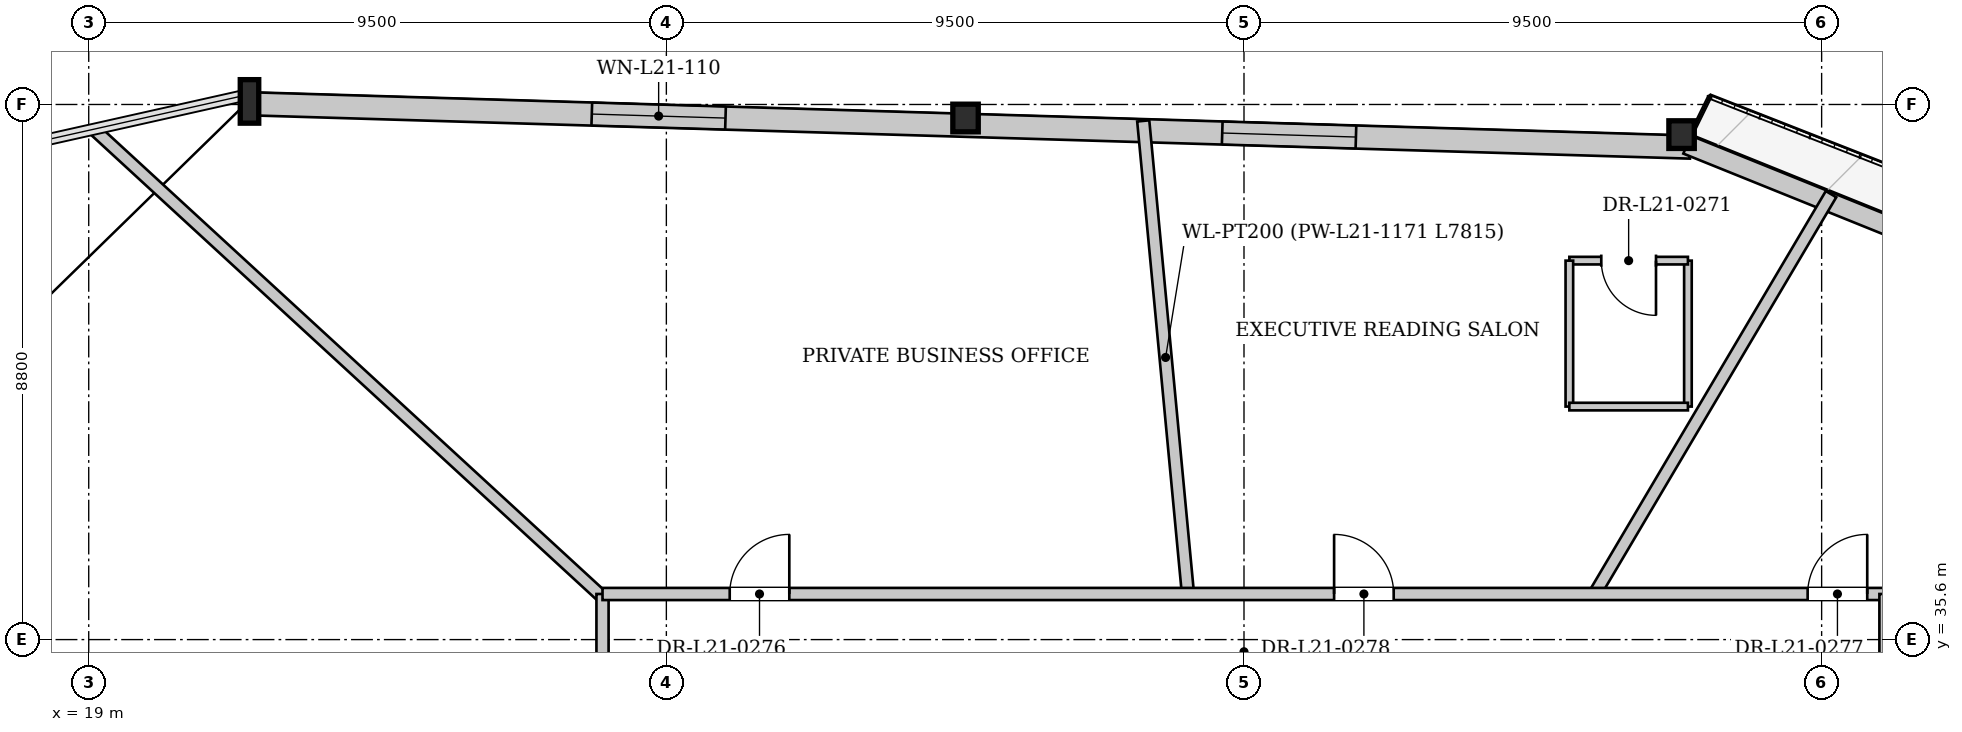
"""IFC4 building model, lengths in metres.
Left out: names, types, materials, properties, quantities, classifications, styles, units other than length and angle.
Written with IfcOpenShell. Run it as: python <this file> out.ifc"""

import sys

from ifc_helpers import new_model, si_unit, direction, frame, frame_2d, origin, origin_2d, place, context, subcontext, project, spatial, rectangle, i_section, extrude, source, transform, mapped, element, fill, save


model = new_model("IFC4")
c1 = context("Model", 3, precision=1e-05, world=origin(), true_north=direction((0.0, 1.0)))
c2 = subcontext(c1, "Body", "Model", "MODEL_VIEW")
j1 = project(units=[si_unit("LENGTHUNIT", "METRE"), si_unit("PLANEANGLEUNIT", "RADIAN")], contexts=[c1])
p1 = place(None, origin())
s1 = spatial("IfcSite", under=j1, at=p1, CompositionType="ELEMENT")
p2 = place(p1, origin())
s2 = spatial("IfcBuilding", under=s1, at=p2, CompositionType="ELEMENT")
p3 = place(p2, frame((0.0, 0.0, 84.4)))
s3 = spatial("IfcBuildingStorey", under=s2, at=p3, CompositionType="ELEMENT", Elevation=84.4)
m1 = source(origin(), c2, "Body", "SweptSolid", [
    extrude(i_section(OverallWidth=0.418, OverallDepth=0.455, WebThickness=0.038, FlangeThickness=0.059, at=origin_2d()), origin(), (0.0, 0.0, 1.0), 3.398),
])
p4 = place(p3, frame((45.345, 43.889, 0.0), z_axis=(-0.087649140389, 0.008980444712, 0.996110927458), x_axis=(-0.101925414299, -0.994792043555, 0.0)))
e1 = element("IfcColumn", 1, at=p4, inside=s3, PredefinedType="COLUMN", context=c2, shape_type="MappedRepresentation", body=[
    mapped(m1, transform((0.0, 0.0, 0.0), x_axis=(1.0, 0.0, 0.0), y_axis=(0.0, 1.0, 0.0), z_axis=(0.0, 0.0, 1.0), scale=1.0)),
])
m2 = source(origin(), c2, "Body", "SweptSolid", [
    extrude(i_section(OverallWidth=0.418, OverallDepth=0.455, WebThickness=0.038, FlangeThickness=0.059, at=origin_2d()), origin(), (0.0, 0.0, 1.0), 3.4),
])
p5 = place(p3, frame((33.563, 44.243, 0.0), z_axis=(-0.084022804734, -0.038851570394, 0.995706143279), x_axis=(0.419697619943, -0.90766398398, 0.0)))
e2 = element("IfcColumn", 2, at=p5, inside=s3, PredefinedType="COLUMN", context=c2, shape_type="MappedRepresentation", body=[
    mapped(m2, transform((0.0, 0.0, 0.0), x_axis=(1.0, 0.0, 0.0), y_axis=(0.0, 1.0, 0.0), z_axis=(0.0, 0.0, 1.0), scale=1.0)),
])
m3 = source(origin(), c2, "Body", "SweptSolid", [
    extrude(i_section(OverallWidth=0.304, OverallDepth=0.716, WebThickness=0.021, FlangeThickness=0.04, at=origin_2d()), origin(), (0.0, 0.0, 1.0), 3.409),
])
p6 = place(p3, frame((21.781, 44.598, 0.0), z_axis=(-0.080144098224, -0.086446761891, 0.993027633492), x_axis=(0.733334244993, -0.679868285126, 0.0)))
e3 = element("IfcColumn", 3, at=p6, inside=s3, PredefinedType="COLUMN", context=c2, shape_type="MappedRepresentation", body=[
    mapped(m3, transform((0.0, 0.0, 0.0), x_axis=(1.0, 0.0, 0.0), y_axis=(0.0, 1.0, 0.0), z_axis=(0.0, 0.0, 1.0), scale=1.0)),
])
p7 = place(p3, frame((21.775, 44.408, 0.0), z_axis=(0.0, 0.0, 1.0), x_axis=(0.999548013015, -0.030062762319, 0.0)))
e4 = element("IfcWall", 4, at=p7, inside=s3, PredefinedType="SOLIDWALL", context=c2, shape_type="SweptSolid", body=[
    extrude(rectangle(XDim=23.575, YDim=0.38, at=frame_2d((11.788, 0.0))), origin(), (0.0, 0.0, 1.0), 2.692),
])
p8 = place(p7, frame((5.501, 0.0, 0.322)))
e5 = element("IfcOpeningElement", 5, at=p8, cuts=e4, PredefinedType="OPENING", context=c2, shape_type="SweptSolid", body=[
    extrude(rectangle(XDim=2.2, YDim=2.25, at=frame_2d((1.1, 1.125))), frame((0.0, 0.2, 0.0), z_axis=(0.0, -1.0, 0.0), x_axis=(1.0, 0.0, 0.0)), (0.0, 0.0, 1.0), 0.4),
])
p9 = place(p7, frame((15.874, 0.0, 0.322)))
e6 = element("IfcOpeningElement", 6, at=p9, cuts=e4, PredefinedType="OPENING", context=c2, shape_type="SweptSolid", body=[
    extrude(rectangle(XDim=2.2, YDim=2.25, at=frame_2d((1.1, 1.125))), frame((0.0, 0.2, 0.0), z_axis=(0.0, -1.0, 0.0), x_axis=(1.0, 0.0, 0.0)), (0.0, 0.0, 1.0), 0.4),
])
p10 = place(p3, frame((45.286, 43.741, 0.0), z_axis=(0.0, 0.0, 1.0), x_axis=(0.927377791708, -0.374126223951, 0.0)))
e7 = element("IfcWall", 7, at=p10, inside=s3, PredefinedType="SOLIDWALL", context=c2, shape_type="SweptSolid", body=[
    extrude(rectangle(XDim=23.575, YDim=0.32, at=frame_2d((11.788, 0.0))), origin(), (0.0, 0.0, 1.0), 2.692),
])
p11 = place(p10, frame((6.994, 0.0, 0.0)))
e8 = element("IfcOpeningElement", 8, at=p11, cuts=e7, PredefinedType="OPENING", context=c2, shape_type="SweptSolid", body=[
    extrude(rectangle(XDim=1.1, YDim=2.3, at=frame_2d((0.55, 1.15))), frame((0.0, 0.17, 0.0), z_axis=(0.0, -1.0, 0.0), x_axis=(1.0, 0.0, 0.0)), (0.0, 0.0, 1.0), 0.34),
])
p12 = place(p10, frame((16.546, 0.0, 0.372)))
e9 = element("IfcOpeningElement", 9, at=p12, cuts=e7, PredefinedType="OPENING", context=c2, shape_type="SweptSolid", body=[
    extrude(rectangle(XDim=1.8, YDim=2.2, at=frame_2d((0.9, 1.1))), frame((0.0, 0.17, 0.0), z_axis=(0.0, -1.0, 0.0), x_axis=(1.0, 0.0, 0.0)), (0.0, 0.0, 1.0), 0.34),
])
p13 = place(p3, frame((37.078, 36.35, 0.0), z_axis=(0.0, 0.0, 1.0), x_axis=(-0.094101381128, 0.995562619864, 0.0)))
e10 = element("IfcWall", 10, at=p13, inside=s3, PredefinedType="PARTITIONING", context=c2, shape_type="SweptSolid", body=[
    extrude(rectangle(XDim=7.814, YDim=0.2, at=frame_2d((3.907, 0.0))), origin(), (0.0, 0.0, 1.0), 3.3),
])
p14 = place(p3, frame((27.45, 36.301, 0.0), z_axis=(0.0, 0.0, 1.0), x_axis=(-0.736099373834, 0.676873482891, 0.0)))
e11 = element("IfcWall", 11, at=p14, inside=s3, PredefinedType="PARTITIONING", context=c2, shape_type="SweptSolid", body=[
    extrude(rectangle(XDim=11.328, YDim=0.2, at=frame_2d((5.664, 0.0))), origin(), (0.0, 0.0, 1.0), 2.795),
])
p15 = place(p3, frame((43.766, 36.35, 0.0), z_axis=(0.0, 0.0, 1.0), x_axis=(0.509052298175, 0.860735591063, 0.0)))
e12 = element("IfcWall", 12, at=p15, inside=s3, PredefinedType="PARTITIONING", context=c2, shape_type="SweptSolid", body=[
    extrude(rectangle(XDim=7.639, YDim=0.2, at=frame_2d((3.82, 0.0))), origin(), (0.0, 0.0, 1.0), 3.3),
])
p16 = place(p3, frame((45.301, 39.432, 0.0), z_axis=(0.0, 0.0, 1.0), x_axis=(0.0, 1.0, 0.0)))
e13 = element("IfcWall", 13, at=p16, inside=s3, PredefinedType="PARTITIONING", context=c2, shape_type="SweptSolid", body=[
    extrude(rectangle(XDim=2.4, YDim=0.125, at=frame_2d((1.2, 0.0))), origin(), (0.0, 0.0, 1.0), 3.3),
])
p17 = place(p3, frame((45.301, 41.832, 0.0), z_axis=(0.0, 0.0, 1.0), x_axis=(-1.0, 0.0, 0.0)))
e14 = element("IfcWall", 14, at=p17, inside=s3, PredefinedType="PARTITIONING", context=c2, shape_type="SweptSolid", body=[
    extrude(rectangle(XDim=1.95, YDim=0.125, at=frame_2d((0.975, 0.0))), origin(), (0.0, 0.0, 1.0), 3.3),
])
p18 = place(p17, frame((0.525, 0.0, 0.0)))
e15 = element("IfcOpeningElement", 15, at=p18, cuts=e14, PredefinedType="OPENING", context=c2, shape_type="SweptSolid", body=[
    extrude(rectangle(XDim=0.9, YDim=2.1, at=frame_2d((0.45, 1.05))), frame((0.0, 0.073, 0.0), z_axis=(0.0, -1.0, 0.0), x_axis=(1.0, 0.0, 0.0)), (0.0, 0.0, 1.0), 0.145),
])
p19 = place(p3, frame((43.351, 41.832, 0.0), z_axis=(0.0, 0.0, 1.0), x_axis=(0.0, -1.0, 0.0)))
e16 = element("IfcWall", 16, at=p19, inside=s3, PredefinedType="PARTITIONING", context=c2, shape_type="SweptSolid", body=[
    extrude(rectangle(XDim=2.4, YDim=0.125, at=frame_2d((1.2, 0.0))), origin(), (0.0, 0.0, 1.0), 2.785),
])
p20 = place(p3, frame((43.351, 39.432, 0.0), z_axis=(0.0, 0.0, 1.0), x_axis=(1.0, 0.0, 0.0)))
e17 = element("IfcWall", 17, at=p20, inside=s3, PredefinedType="PARTITIONING", context=c2, shape_type="SweptSolid", body=[
    extrude(rectangle(XDim=1.95, YDim=0.125, at=frame_2d((0.975, 0.0))), origin(), (0.0, 0.0, 1.0), 2.925),
])
p21 = place(p3, frame((27.45, 16.85, 0.0), z_axis=(0.0, 0.0, 1.0), x_axis=(0.0, 1.0, 0.0)))
e18 = element("IfcWall", 18, at=p21, inside=s3, PredefinedType="PARTITIONING", context=c2, shape_type="SweptSolid", body=[
    extrude(rectangle(XDim=19.5, YDim=0.2, at=frame_2d((9.75, 0.0))), origin(), (0.0, 0.0, 1.0), 3.3),
])
p22 = place(p21, frame((14.243, 0.0, 0.0)))
e19 = element("IfcOpeningElement", 19, at=p22, cuts=e18, PredefinedType="OPENING", context=c2, shape_type="SweptSolid", body=[
    extrude(rectangle(XDim=0.98, YDim=2.15, at=frame_2d((0.49, 1.075))), frame((0.0, 0.11, 0.0), z_axis=(0.0, -1.0, 0.0), x_axis=(1.0, 0.0, 0.0)), (0.0, 0.0, 1.0), 0.22),
])
p23 = place(p21, frame((2.375, 0.0, 0.0)))
e20 = element("IfcOpeningElement", 20, at=p23, cuts=e18, PredefinedType="OPENING", context=c2, shape_type="SweptSolid", body=[
    extrude(rectangle(XDim=0.98, YDim=2.15, at=frame_2d((0.49, 1.075))), frame((0.0, 0.11, 0.0), z_axis=(0.0, -1.0, 0.0), x_axis=(1.0, 0.0, 0.0)), (0.0, 0.0, 1.0), 0.22),
])
p24 = place(p3, frame((27.45, 36.35, 0.0), z_axis=(0.0, 0.0, 1.0), x_axis=(1.0, 0.0, 0.0)))
e21 = element("IfcWall", 21, at=p24, inside=s3, PredefinedType="PARTITIONING", context=c2, shape_type="SweptSolid", body=[
    extrude(rectangle(XDim=21.1, YDim=0.2, at=frame_2d((10.55, 0.0))), origin(), (0.0, 0.0, 1.0), 3.3),
])
p25 = place(p24, frame((2.092, 0.0, 0.0)))
e22 = element("IfcOpeningElement", 22, at=p25, cuts=e21, PredefinedType="OPENING", context=c2, shape_type="SweptSolid", body=[
    extrude(rectangle(XDim=0.98, YDim=2.15, at=frame_2d((0.49, 1.075))), frame((0.0, 0.11, 0.0), z_axis=(0.0, -1.0, 0.0), x_axis=(1.0, 0.0, 0.0)), (0.0, 0.0, 1.0), 0.22),
])
p26 = place(p24, frame((19.82, 0.0, 0.0)))
e23 = element("IfcOpeningElement", 23, at=p26, cuts=e21, PredefinedType="OPENING", context=c2, shape_type="SweptSolid", body=[
    extrude(rectangle(XDim=0.98, YDim=2.15, at=frame_2d((0.49, 1.075))), frame((0.0, 0.11, 0.0), z_axis=(0.0, -1.0, 0.0), x_axis=(1.0, 0.0, 0.0)), (0.0, 0.0, 1.0), 0.22),
])
p27 = place(p24, frame((12.032, 0.0, 0.0)))
e24 = element("IfcOpeningElement", 24, at=p27, cuts=e21, PredefinedType="OPENING", context=c2, shape_type="SweptSolid", body=[
    extrude(rectangle(XDim=0.98, YDim=2.15, at=frame_2d((0.49, 1.075))), frame((0.0, 0.11, 0.0), z_axis=(0.0, -1.0, 0.0), x_axis=(1.0, 0.0, 0.0)), (0.0, 0.0, 1.0), 0.22),
])
p28 = place(p3, frame((48.55, 16.85, 0.0), z_axis=(0.0, 0.0, 1.0), x_axis=(0.0, 1.0, 0.0)))
e25 = element("IfcWall", 25, at=p28, inside=s3, PredefinedType="PARTITIONING", context=c2, shape_type="SweptSolid", body=[
    extrude(rectangle(XDim=19.5, YDim=0.2, at=frame_2d((9.75, 0.0))), origin(), (0.0, 0.0, 1.0), 3.3),
])
p29 = place(p28, frame((4.972, 0.0, 0.0)))
e26 = element("IfcOpeningElement", 26, at=p29, cuts=e25, PredefinedType="OPENING", context=c2, shape_type="SweptSolid", body=[
    extrude(rectangle(XDim=0.98, YDim=2.15, at=frame_2d((0.49, 1.075))), frame((0.0, 0.11, 0.0), z_axis=(0.0, -1.0, 0.0), x_axis=(1.0, 0.0, 0.0)), (0.0, 0.0, 1.0), 0.22),
])
m4 = source(origin(), c2, "Body", "SweptSolid", [
    extrude(rectangle(XDim=2.2, YDim=2.25, at=frame_2d((1.1, 1.125))), frame((0.0, 0.03, 0.0), z_axis=(0.0, -1.0, 0.0), x_axis=(1.0, 0.0, 0.0)), (0.0, 0.0, 1.0), 0.06),
])
p30 = place(p8, origin())
e27 = element("IfcWindow", 27, at=p30, inside=s3, PartitioningType="SINGLE_PANEL", PredefinedType="WINDOW", context=c2, shape_type="MappedRepresentation", body=[
    mapped(m4, transform((0.0, 0.0, 0.0), x_axis=(1.0, 0.0, 0.0), y_axis=(0.0, 1.0, 0.0), z_axis=(0.0, 0.0, 1.0), scale=1.0)),
])
fill(e5, e27)
p31 = place(p9, origin())
e28 = element("IfcWindow", 28, at=p31, inside=s3, PartitioningType="SINGLE_PANEL", PredefinedType="WINDOW", context=c2, shape_type="MappedRepresentation", body=[
    mapped(m4, transform((0.0, 0.0, 0.0), x_axis=(1.0, 0.0, 0.0), y_axis=(0.0, 1.0, 0.0), z_axis=(0.0, 0.0, 1.0), scale=1.0)),
])
fill(e6, e28)
m5 = source(origin(), c2, "Body", "SweptSolid", [
    extrude(rectangle(XDim=0.9, YDim=2.1, at=frame_2d((0.45, 1.05))), frame((0.0, 0.025, 0.0), z_axis=(0.0, -1.0, 0.0), x_axis=(1.0, 0.0, 0.0)), (0.0, 0.0, 1.0), 0.05),
])
p32 = place(p18, origin())
e29 = element("IfcDoor", 29, at=p32, inside=s3, OperationType="SINGLE_SWING_LEFT", PredefinedType="DOOR", context=c2, shape_type="MappedRepresentation", body=[
    mapped(m5, transform((0.0, 0.0, 0.0), x_axis=(1.0, 0.0, 0.0), y_axis=(0.0, 1.0, 0.0), z_axis=(0.0, 0.0, 1.0), scale=1.0)),
])
fill(e15, e29)
m6 = source(origin(), c2, "Body", "SweptSolid", [
    extrude(rectangle(XDim=0.98, YDim=2.15, at=frame_2d((0.49, 1.075))), frame((0.0, 0.025, 0.0), z_axis=(0.0, -1.0, 0.0), x_axis=(1.0, 0.0, 0.0)), (0.0, 0.0, 1.0), 0.05),
])
p33 = place(p25, origin())
e30 = element("IfcDoor", 30, at=p33, inside=s3, OperationType="SINGLE_SWING_RIGHT", PredefinedType="DOOR", context=c2, shape_type="MappedRepresentation", body=[
    mapped(m6, transform((0.0, 0.0, 0.0), x_axis=(1.0, 0.0, 0.0), y_axis=(0.0, 1.0, 0.0), z_axis=(0.0, 0.0, 1.0), scale=1.0)),
])
fill(e22, e30)
p34 = place(p26, origin())
e31 = element("IfcDoor", 31, at=p34, inside=s3, OperationType="SINGLE_SWING_RIGHT", PredefinedType="DOOR", context=c2, shape_type="MappedRepresentation", body=[
    mapped(m6, transform((0.0, 0.0, 0.0), x_axis=(1.0, 0.0, 0.0), y_axis=(0.0, 1.0, 0.0), z_axis=(0.0, 0.0, 1.0), scale=1.0)),
])
fill(e23, e31)
p35 = place(p27, origin())
e32 = element("IfcDoor", 32, at=p35, inside=s3, OperationType="SINGLE_SWING_LEFT", PredefinedType="DOOR", context=c2, shape_type="MappedRepresentation", body=[
    mapped(m6, transform((0.0, 0.0, 0.0), x_axis=(1.0, 0.0, 0.0), y_axis=(0.0, 1.0, 0.0), z_axis=(0.0, 0.0, 1.0), scale=1.0)),
])
fill(e24, e32)
save(model, sys.argv[1])
